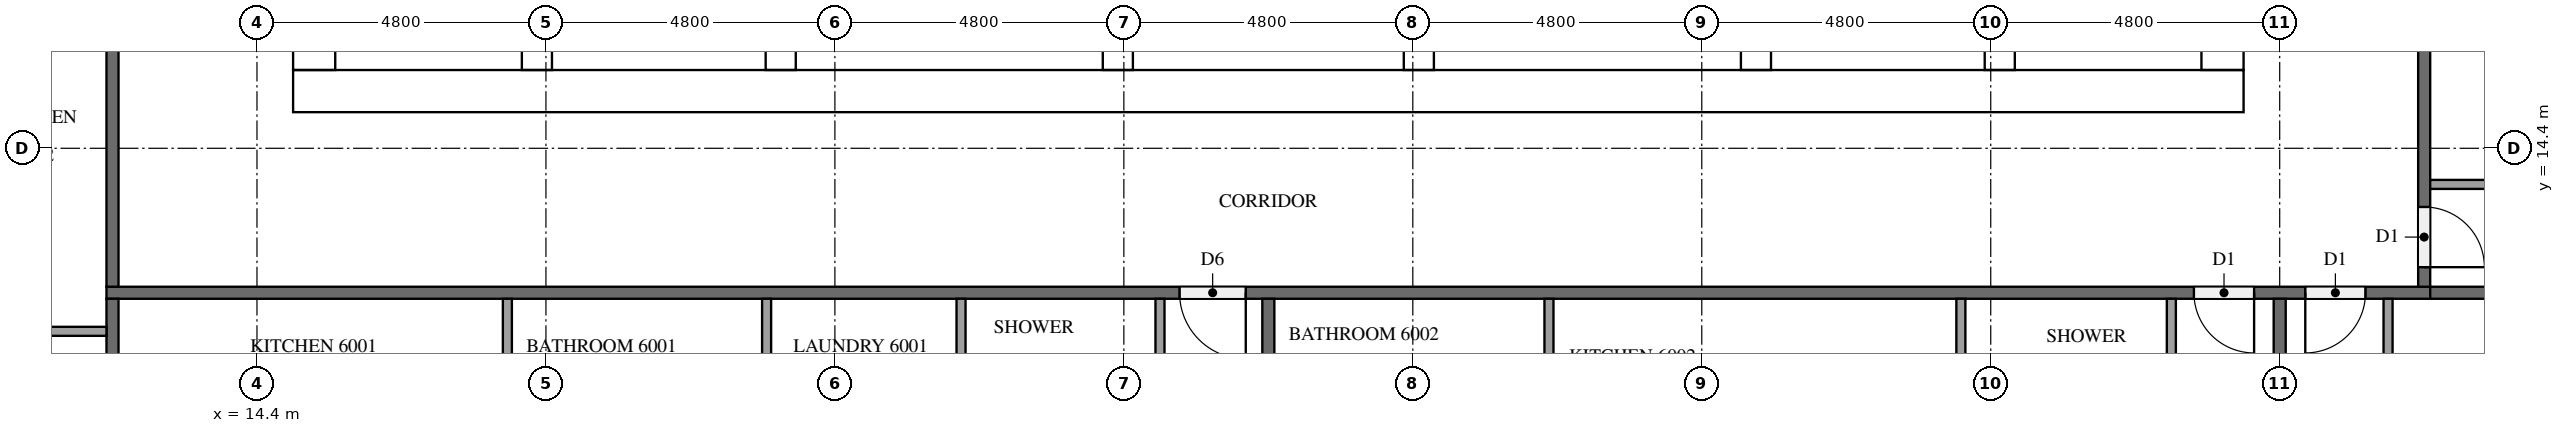
"""IFC4 building model, lengths in metres.
Left out: names, types, materials, properties, quantities, classifications, styles, units other than length and angle.
Written with IfcOpenShell. Run it as: python <this file> out.ifc"""

import sys

from ifc_helpers import new_model, si_unit, direction, frame, frame_2d, origin, place, context, subcontext, project, spatial, rectangle, extrude, element, fill, save


model = new_model("IFC4")
c1 = context("Model", 3, precision=1e-05, world=origin(), true_north=direction((0.0, 1.0)))
c2 = subcontext(c1, "Body", "Model", "MODEL_VIEW")
j1 = project(units=[si_unit("LENGTHUNIT", "METRE"), si_unit("PLANEANGLEUNIT", "RADIAN")], contexts=[c1])
p1 = place(None, origin())
s1 = spatial("IfcSite", under=j1, at=p1, CompositionType="ELEMENT")
p2 = place(p1, origin())
s2 = spatial("IfcBuilding", under=s1, at=p2, CompositionType="ELEMENT")
p3 = place(p2, frame((0.0, 0.0, 229.8)))
s3 = spatial("IfcBuildingStorey", under=s2, at=p3, CompositionType="ELEMENT", Elevation=229.8)
p4 = place(p3, frame((15.0, 15.35, 0.0), z_axis=(0.0, 0.0, 1.0), x_axis=(1.0, 0.0, 0.0)))
e1 = element("IfcWall", 1, at=p4, inside=s3, PredefinedType="SHEAR", context=c2, shape_type="SweptSolid", body=[
    extrude(rectangle(XDim=32.4, YDim=0.7, at=frame_2d((16.2, 0.0))), origin(), (0.0, 0.0, 1.0), 3.1),
])
p5 = place(p4, frame((15.3, 0.0, 0.0)))
e2 = element("IfcOpeningElement", 2, at=p5, cuts=e1, PredefinedType="OPENING", context=c2, shape_type="SweptSolid", body=[
    extrude(rectangle(XDim=1.8, YDim=2.1, at=frame_2d((0.9, 1.05))), frame((0.0, 0.36, 0.0), z_axis=(0.0, -1.0, 0.0), x_axis=(1.0, 0.0, 0.0)), (0.0, 0.0, 1.0), 0.72),
])
p6 = place(p3, frame((15.35, 15.7, 0.0), z_axis=(0.0, 0.0, 1.0), x_axis=(0.0, 1.0, 0.0)))
e3 = element("IfcWall", 3, at=p6, inside=s3, PredefinedType="SHEAR", context=c2, shape_type="SweptSolid", body=[
    extrude(rectangle(XDim=21.4, YDim=0.7, at=frame_2d((10.7, 0.0))), origin(), (0.0, 0.0, 1.0), 3.1),
])
p7 = place(p6, frame((5.06, 0.0, 0.0)))
e4 = element("IfcOpeningElement", 4, at=p7, cuts=e3, PredefinedType="OPENING", context=c2, shape_type="SweptSolid", body=[
    extrude(rectangle(XDim=1.2, YDim=2.1, at=frame_2d((0.6, 1.05))), frame((0.0, 0.36, 0.0), z_axis=(0.0, -1.0, 0.0), x_axis=(1.0, 0.0, 0.0)), (0.0, 0.0, 1.0), 0.72),
])
p8 = place(p3, frame((47.05, 15.7, 0.0), z_axis=(0.0, 0.0, 1.0), x_axis=(0.0, 1.0, 0.0)))
e5 = element("IfcWall", 5, at=p8, inside=s3, PredefinedType="SHEAR", context=c2, shape_type="SweptSolid", body=[
    extrude(rectangle(XDim=21.4, YDim=0.7, at=frame_2d((10.7, 0.0))), origin(), (0.0, 0.0, 1.0), 3.1),
])
p9 = place(p8, frame((10.4, 0.0, 0.0)))
e6 = element("IfcOpeningElement", 6, at=p9, cuts=e5, PredefinedType="OPENING", context=c2, shape_type="SweptSolid", body=[
    extrude(rectangle(XDim=1.2, YDim=2.1, at=frame_2d((0.6, 1.05))), frame((0.0, 0.36, 0.0), z_axis=(0.0, -1.0, 0.0), x_axis=(1.0, 0.0, 0.0)), (0.0, 0.0, 1.0), 0.72),
])
p10 = place(p3, frame((19.05, 15.7, 0.0), z_axis=(0.0, 0.0, 1.0), x_axis=(0.0, 1.0, 0.0)))
e7 = element("IfcWall", 7, at=p10, inside=s3, PredefinedType="SHEAR", context=c2, shape_type="SweptSolid", body=[
    extrude(rectangle(XDim=15.3, YDim=0.5, at=frame_2d((7.65, 0.0))), origin(), (0.0, 0.0, 1.0), 3.1),
])
p11 = place(p10, frame((9.75, 0.0, 0.0)))
e8 = element("IfcOpeningElement", 8, at=p11, cuts=e7, PredefinedType="OPENING", context=c2, shape_type="SweptSolid", body=[
    extrude(rectangle(XDim=1.1, YDim=2.1, at=frame_2d((0.55, 1.05))), frame((0.0, 0.26, 0.0), z_axis=(0.0, -1.0, 0.0), x_axis=(1.0, 0.0, 0.0)), (0.0, 0.0, 1.0), 0.52),
])
p12 = place(p10, frame((13.25, 0.0, 0.0)))
e9 = element("IfcOpeningElement", 9, at=p12, cuts=e7, PredefinedType="OPENING", context=c2, shape_type="SweptSolid", body=[
    extrude(rectangle(XDim=1.1, YDim=2.1, at=frame_2d((0.55, 1.05))), frame((0.0, 0.26, 0.0), z_axis=(0.0, -1.0, 0.0), x_axis=(1.0, 0.0, 0.0)), (0.0, 0.0, 1.0), 0.52),
])
p13 = place(p10, frame((0.5, 0.0, 0.0)))
e10 = element("IfcOpeningElement", 10, at=p13, cuts=e7, PredefinedType="OPENING", context=c2, shape_type="SweptSolid", body=[
    extrude(rectangle(XDim=1.2, YDim=2.1, at=frame_2d((0.6, 1.05))), frame((0.0, 0.26, 0.0), z_axis=(0.0, -1.0, 0.0), x_axis=(1.0, 0.0, 0.0)), (0.0, 0.0, 1.0), 0.52),
])
p14 = place(p3, frame((23.1, 15.7, 0.0), z_axis=(0.0, 0.0, 1.0), x_axis=(0.0, 1.0, 0.0)))
e11 = element("IfcWall", 11, at=p14, inside=s3, PredefinedType="SHEAR", context=c2, shape_type="SweptSolid", body=[
    extrude(rectangle(XDim=21.4, YDim=0.5, at=frame_2d((10.7, 0.0))), origin(), (0.0, 0.0, 1.0), 3.1),
])
p15 = place(p3, frame((39.3, 15.7, 0.0), z_axis=(0.0, 0.0, 1.0), x_axis=(0.0, 1.0, 0.0)))
e12 = element("IfcWall", 12, at=p15, inside=s3, PredefinedType="SHEAR", context=c2, shape_type="SweptSolid", body=[
    extrude(rectangle(XDim=8.55, YDim=0.5, at=frame_2d((4.275, 0.0))), origin(), (0.0, 0.0, 1.0), 3.1),
])
p16 = place(p3, frame((43.35, 15.7, 0.0), z_axis=(0.0, 0.0, 1.0), x_axis=(0.0, 1.0, 0.0)))
e13 = element("IfcWall", 13, at=p16, inside=s3, PredefinedType="SHEAR", context=c2, shape_type="SweptSolid", body=[
    extrude(rectangle(XDim=8.55, YDim=0.5, at=frame_2d((4.275, 0.0))), origin(), (0.0, 0.0, 1.0), 3.1),
])
p17 = place(p16, frame((0.5, 0.0, 0.0)))
e14 = element("IfcOpeningElement", 14, at=p17, cuts=e13, PredefinedType="OPENING", context=c2, shape_type="SweptSolid", body=[
    extrude(rectangle(XDim=1.2, YDim=2.1, at=frame_2d((0.6, 1.05))), frame((0.0, 0.26, 0.0), z_axis=(0.0, -1.0, 0.0), x_axis=(1.0, 0.0, 0.0)), (0.0, 0.0, 1.0), 0.52),
])
for number, where, z_axis, x_axis in (
    (15, (28.7, 15.7, 0.0), (0.0, 0.0, 1.0), (0.0, 1.0, 0.0)),
    (16, (33.7, 15.7, 0.0), (0.0, 0.0, 1.0), (0.0, 1.0, 0.0)),
):
    element("IfcWall", number, at=place(p3, frame(where, z_axis=z_axis, x_axis=x_axis)), inside=s3, PredefinedType="SHEAR", context=c2, shape_type="SweptSolid", body=[
        extrude(rectangle(XDim=2.8, YDim=0.5, at=frame_2d((1.4, 0.0))), origin(), (0.0, 0.0, 1.0), 3.1),
    ])
p18 = place(p3, frame((50.5, 12.0, 0.0), z_axis=(0.0, 0.0, 1.0), x_axis=(-1.0, 0.0, 0.0)))
e17 = element("IfcWall", 17, at=p18, inside=s3, PredefinedType="PARTITIONING", context=c2, shape_type="SweptSolid", body=[
    extrude(rectangle(XDim=38.6, YDim=0.2, at=frame_2d((19.3, 0.0))), origin(), (0.0, 0.0, 1.0), 3.1),
])
p19 = place(p18, frame((19.675, 0.0, 0.0)))
e18 = element("IfcOpeningElement", 18, at=p19, cuts=e17, PredefinedType="OPENING", context=c2, shape_type="SweptSolid", body=[
    extrude(rectangle(XDim=1.1, YDim=2.1, at=frame_2d((0.55, 1.05))), frame((0.0, 0.11, 0.0), z_axis=(0.0, -1.0, 0.0), x_axis=(1.0, 0.0, 0.0)), (0.0, 0.0, 1.0), 0.22),
])
p20 = place(p18, frame((2.925, 0.0, 0.0)))
e19 = element("IfcOpeningElement", 19, at=p20, cuts=e17, PredefinedType="OPENING", context=c2, shape_type="SweptSolid", body=[
    extrude(rectangle(XDim=1.0, YDim=2.1, at=frame_2d((0.5, 1.05))), frame((0.0, 0.11, 0.0), z_axis=(0.0, -1.0, 0.0), x_axis=(1.0, 0.0, 0.0)), (0.0, 0.0, 1.0), 0.22),
])
p21 = place(p18, frame((1.075, 0.0, 0.0)))
e20 = element("IfcOpeningElement", 20, at=p21, cuts=e17, PredefinedType="OPENING", context=c2, shape_type="SweptSolid", body=[
    extrude(rectangle(XDim=1.0, YDim=2.1, at=frame_2d((0.5, 1.05))), frame((0.0, 0.11, 0.0), z_axis=(0.0, -1.0, 0.0), x_axis=(1.0, 0.0, 0.0)), (0.0, 0.0, 1.0), 0.22),
])
p22 = place(p3, frame((50.4, 40.7, 0.0), z_axis=(0.0, 0.0, 1.0), x_axis=(0.0, -1.0, 0.0)))
e21 = element("IfcWall", 21, at=p22, inside=s3, PredefinedType="PARTITIONING", context=c2, shape_type="SweptSolid", body=[
    extrude(rectangle(XDim=28.6, YDim=0.2, at=frame_2d((14.3, 0.0))), origin(), (0.0, 0.0, 1.0), 3.1),
])
p23 = place(p22, frame((27.275, 0.0, 0.0)))
e22 = element("IfcOpeningElement", 22, at=p23, cuts=e21, PredefinedType="OPENING", context=c2, shape_type="SweptSolid", body=[
    extrude(rectangle(XDim=1.0, YDim=2.1, at=frame_2d((0.5, 1.05))), frame((0.0, 0.11, 0.0), z_axis=(0.0, -1.0, 0.0), x_axis=(1.0, 0.0, 0.0)), (0.0, 0.0, 1.0), 0.22),
])
p24 = place(p22, frame((2.725, 0.0, 0.0)))
e23 = element("IfcOpeningElement", 23, at=p24, cuts=e21, PredefinedType="OPENING", context=c2, shape_type="SweptSolid", body=[
    extrude(rectangle(XDim=1.0, YDim=2.1, at=frame_2d((0.5, 1.05))), frame((0.0, 0.11, 0.0), z_axis=(0.0, -1.0, 0.0), x_axis=(1.0, 0.0, 0.0)), (0.0, 0.0, 1.0), 0.22),
])
p25 = place(p22, frame((0.875, 0.0, 0.0)))
e24 = element("IfcOpeningElement", 24, at=p25, cuts=e21, PredefinedType="OPENING", context=c2, shape_type="SweptSolid", body=[
    extrude(rectangle(XDim=1.0, YDim=2.1, at=frame_2d((0.5, 1.05))), frame((0.0, 0.11, 0.0), z_axis=(0.0, -1.0, 0.0), x_axis=(1.0, 0.0, 0.0)), (0.0, 0.0, 1.0), 0.22),
])
p26 = place(p3, frame((12.0, 12.1, 0.0), z_axis=(0.0, 0.0, 1.0), x_axis=(0.0, 1.0, 0.0)))
e25 = element("IfcWall", 25, at=p26, inside=s3, PredefinedType="PARTITIONING", context=c2, shape_type="SweptSolid", body=[
    extrude(rectangle(XDim=28.6, YDim=0.2, at=frame_2d((14.3, 0.0))), origin(), (0.0, 0.0, 1.0), 3.1),
])
p27 = place(p26, frame((27.275, 0.0, 0.0)))
e26 = element("IfcOpeningElement", 26, at=p27, cuts=e25, PredefinedType="OPENING", context=c2, shape_type="SweptSolid", body=[
    extrude(rectangle(XDim=1.0, YDim=2.1, at=frame_2d((0.5, 1.05))), frame((0.0, 0.11, 0.0), z_axis=(0.0, -1.0, 0.0), x_axis=(1.0, 0.0, 0.0)), (0.0, 0.0, 1.0), 0.22),
])
p28 = place(p26, frame((20.075, 0.0, 0.0)))
e27 = element("IfcOpeningElement", 27, at=p28, cuts=e25, PredefinedType="OPENING", context=c2, shape_type="SweptSolid", body=[
    extrude(rectangle(XDim=1.0, YDim=2.1, at=frame_2d((0.5, 1.05))), frame((0.0, 0.11, 0.0), z_axis=(0.0, -1.0, 0.0), x_axis=(1.0, 0.0, 0.0)), (0.0, 0.0, 1.0), 0.22),
])
p29 = place(p26, frame((10.425, 0.0, 0.0)))
e28 = element("IfcOpeningElement", 28, at=p29, cuts=e25, PredefinedType="OPENING", context=c2, shape_type="SweptSolid", body=[
    extrude(rectangle(XDim=1.1, YDim=2.1, at=frame_2d((0.55, 1.05))), frame((0.0, 0.11, 0.0), z_axis=(0.0, -1.0, 0.0), x_axis=(1.0, 0.0, 0.0)), (0.0, 0.0, 1.0), 0.22),
])
for number, where, z_axis, x_axis in (
    (29, (31.2, 11.9, 0.0), (0.0, 0.0, 1.0), (0.0, -1.0, 0.0)),
    (30, (12.0, 4.9, 0.0), (0.0, 0.0, 1.0), (0.0, 1.0, 0.0)),
):
    element("IfcWall", number, at=place(p3, frame(where, z_axis=z_axis, x_axis=x_axis)), inside=s3, PredefinedType="PARTITIONING", context=c2, shape_type="SweptSolid", body=[
        extrude(rectangle(XDim=7.0, YDim=0.2, at=frame_2d((3.5, 0.0))), origin(), (0.0, 0.0, 1.0), 3.1),
    ])
p30 = place(p3, frame((48.0, 11.9, 0.0), z_axis=(0.0, 0.0, 1.0), x_axis=(0.0, -1.0, 0.0)))
e31 = element("IfcWall", 31, at=p30, inside=s3, PredefinedType="PARTITIONING", context=c2, shape_type="SweptSolid", body=[
    extrude(rectangle(XDim=6.775, YDim=0.2, at=frame_2d((3.387, 0.0))), origin(), (0.0, 0.0, 1.0), 3.1),
])
p31 = place(p3, frame((50.5, 12.0, 0.0), z_axis=(0.0, 0.0, 1.0), x_axis=(1.0, 0.0, 0.0)))
e32 = element("IfcWall", 32, at=p31, inside=s3, PredefinedType="PARTITIONING", context=c2, shape_type="SweptSolid", body=[
    extrude(rectangle(XDim=11.8, YDim=0.2, at=frame_2d((5.9, 0.0))), origin(), (0.0, 0.0, 1.0), 3.1),
])
for number, where, z_axis, x_axis in (
    (33, (26.095, 11.9, 0.0), (0.0, 0.0, 1.0), (0.0, -1.0, 0.0)),
    (34, (22.865, 11.9, 0.0), (0.0, 0.0, 1.0), (0.0, -1.0, 0.0)),
    (35, (18.559, 11.9, 0.0), (0.0, 0.0, 1.0), (0.0, -1.0, 0.0)),
):
    element("IfcWall", number, at=place(p3, frame(where, z_axis=z_axis, x_axis=x_axis)), inside=s3, PredefinedType="PARTITIONING", context=c2, shape_type="SweptSolid", body=[
        extrude(rectangle(XDim=1.775, YDim=0.15, at=frame_2d((0.887, 0.0))), origin(), (0.0, 0.0, 1.0), 3.1),
    ])
for number, where, z_axis, x_axis in (
    (36, (29.4, 11.9, 0.0), (0.0, 0.0, 1.0), (0.0, -1.0, 0.0)),
    (37, (42.704, 11.9, 0.0), (0.0, 0.0, 1.0), (0.0, -1.0, 0.0)),
    (38, (35.862, 11.9, 0.0), (0.0, 0.0, 1.0), (0.0, -1.0, 0.0)),
):
    element("IfcWall", number, at=place(p3, frame(where, z_axis=z_axis, x_axis=x_axis)), inside=s3, PredefinedType="PARTITIONING", context=c2, shape_type="SweptSolid", body=[
        extrude(rectangle(XDim=1.925, YDim=0.15, at=frame_2d((0.962, 0.0))), origin(), (0.0, 0.0, 1.0), 3.1),
    ])
p32 = place(p3, frame((46.2, 11.9, 0.0), z_axis=(0.0, 0.0, 1.0), x_axis=(0.0, -1.0, 0.0)))
e39 = element("IfcWall", 39, at=p32, inside=s3, PredefinedType="PARTITIONING", context=c2, shape_type="SweptSolid", body=[
    extrude(rectangle(XDim=2.075, YDim=0.15, at=frame_2d((1.038, 0.0))), origin(), (0.0, 0.0, 1.0), 3.1),
])
p33 = place(p3, frame((49.8, 11.9, 0.0), z_axis=(0.0, 0.0, 1.0), x_axis=(0.0, -1.0, 0.0)))
e40 = element("IfcWall", 40, at=p33, inside=s3, PredefinedType="PARTITIONING", context=c2, shape_type="SweptSolid", body=[
    extrude(rectangle(XDim=2.225, YDim=0.15, at=frame_2d((1.112, 0.0))), origin(), (0.0, 0.0, 1.0), 3.1),
])
p34 = place(p3, frame((50.5, 13.8, 0.0), z_axis=(0.0, 0.0, 1.0), x_axis=(1.0, 0.0, 0.0)))
e41 = element("IfcWall", 41, at=p34, inside=s3, PredefinedType="PARTITIONING", context=c2, shape_type="SweptSolid", body=[
    extrude(rectangle(XDim=3.275, YDim=0.15, at=frame_2d((1.637, 0.0))), origin(), (0.0, 0.0, 1.0), 3.1),
])
p35 = place(p3, frame((11.9, 11.359, 0.0), z_axis=(0.0, 0.0, 1.0), x_axis=(-1.0, 0.0, 0.0)))
e42 = element("IfcWall", 42, at=p35, inside=s3, PredefinedType="PARTITIONING", context=c2, shape_type="SweptSolid", body=[
    extrude(rectangle(XDim=2.375, YDim=0.15, at=frame_2d((1.188, 0.0))), origin(), (0.0, 0.0, 1.0), 3.1),
])
p36 = place(p5, frame((1.8, 0.0, 0.0), z_axis=(0.0, 0.0, 1.0), x_axis=(-1.0, 0.0, 0.0)))
e43 = element("IfcDoor", 43, at=p36, inside=s3, OperationType="DOUBLE_DOOR_SINGLE_SWING", PredefinedType="DOOR", context=c2, shape_type="SweptSolid", body=[
    extrude(rectangle(XDim=1.8, YDim=2.1, at=frame_2d((0.9, 1.05))), frame((0.0, 0.025, 0.0), z_axis=(0.0, -1.0, 0.0), x_axis=(1.0, 0.0, 0.0)), (0.0, 0.0, 1.0), 0.05),
])
fill(e2, e43)
p37 = place(p19, origin())
e44 = element("IfcDoor", 44, at=p37, inside=s3, OperationType="SINGLE_SWING_LEFT", PredefinedType="DOOR", context=c2, shape_type="SweptSolid", body=[
    extrude(rectangle(XDim=1.1, YDim=2.1, at=frame_2d((0.55, 1.05))), frame((0.0, 0.025, 0.0), z_axis=(0.0, -1.0, 0.0), x_axis=(1.0, 0.0, 0.0)), (0.0, 0.0, 1.0), 0.05),
])
fill(e18, e44)
p38 = place(p20, origin())
e45 = element("IfcDoor", 45, at=p38, inside=s3, OperationType="SINGLE_SWING_LEFT", PredefinedType="DOOR", context=c2, shape_type="SweptSolid", body=[
    extrude(rectangle(XDim=1.0, YDim=2.1, at=frame_2d((0.5, 1.05))), frame((0.0, 0.025, 0.0), z_axis=(0.0, -1.0, 0.0), x_axis=(1.0, 0.0, 0.0)), (0.0, 0.0, 1.0), 0.05),
])
fill(e19, e45)
p39 = place(p21, origin())
e46 = element("IfcDoor", 46, at=p39, inside=s3, OperationType="SINGLE_SWING_RIGHT", PredefinedType="DOOR", context=c2, shape_type="SweptSolid", body=[
    extrude(rectangle(XDim=1.0, YDim=2.1, at=frame_2d((0.5, 1.05))), frame((0.0, 0.025, 0.0), z_axis=(0.0, -1.0, 0.0), x_axis=(1.0, 0.0, 0.0)), (0.0, 0.0, 1.0), 0.05),
])
fill(e20, e46)
p40 = place(p23, origin())
e47 = element("IfcDoor", 47, at=p40, inside=s3, OperationType="SINGLE_SWING_RIGHT", PredefinedType="DOOR", context=c2, shape_type="SweptSolid", body=[
    extrude(rectangle(XDim=1.0, YDim=2.1, at=frame_2d((0.5, 1.05))), frame((0.0, 0.025, 0.0), z_axis=(0.0, -1.0, 0.0), x_axis=(1.0, 0.0, 0.0)), (0.0, 0.0, 1.0), 0.05),
])
fill(e22, e47)
save(model, sys.argv[1])
